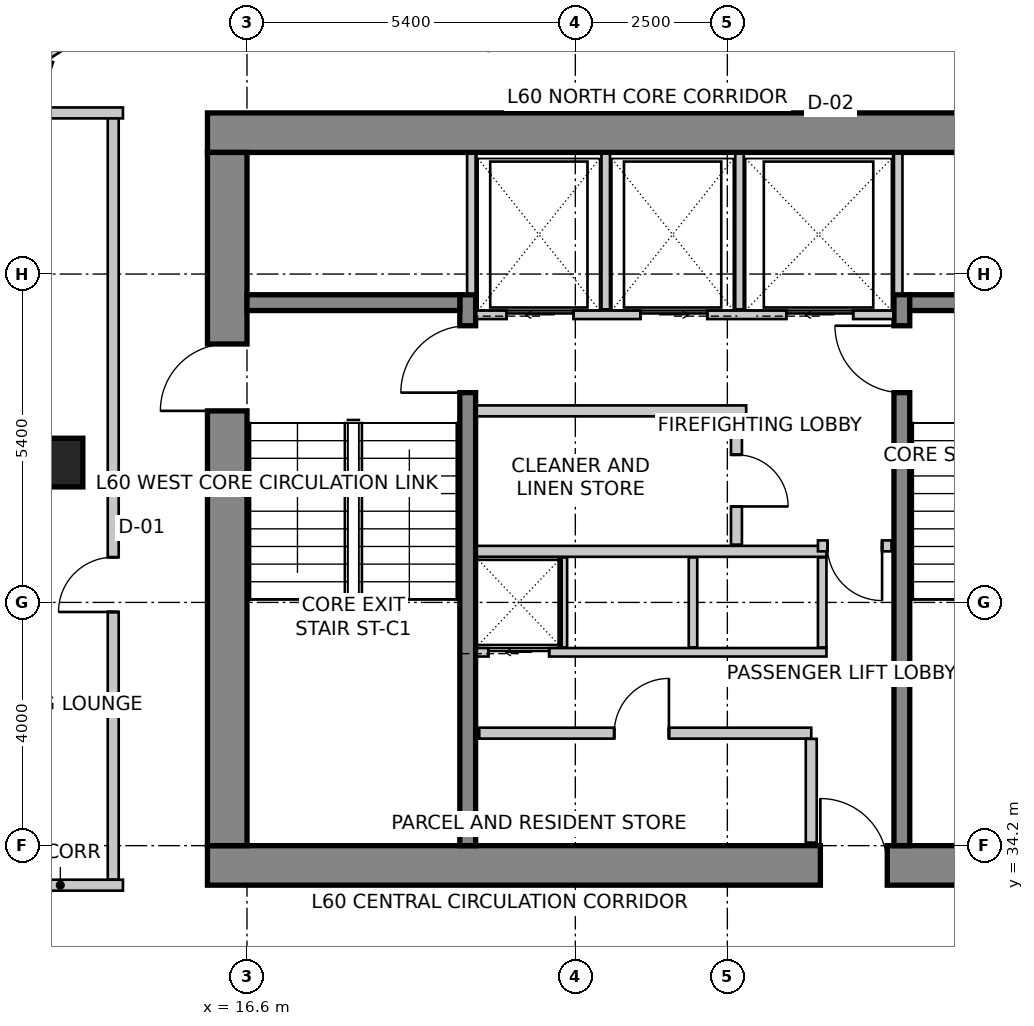
"""IFC4 building model, lengths in metres.
Left out: names, types, materials, properties, quantities, classifications, styles, units other than length and angle.
Written with IfcOpenShell. Run it as: python <this file> out.ifc"""

import sys

from ifc_helpers import new_model, si_unit, direction, frame, frame_2d, origin, origin_2d, place, context, subcontext, project, spatial, rectangle, extrude, source, transform, mapped, element, fill, save


model = new_model("IFC4")
c1 = context("Model", 3, precision=1e-05, world=origin(), true_north=direction((0.0, 1.0)))
c2 = subcontext(c1, "Body", "Model", "MODEL_VIEW")
j1 = project(units=[si_unit("LENGTHUNIT", "METRE"), si_unit("PLANEANGLEUNIT", "RADIAN")], contexts=[c1])
p1 = place(None, origin())
s1 = spatial("IfcSite", under=j1, at=p1, CompositionType="ELEMENT")
p2 = place(p1, origin())
s2 = spatial("IfcBuilding", under=s1, at=p2, CompositionType="ELEMENT")
p3 = place(p2, frame((0.0, 0.0, 235.9)))
s3 = spatial("IfcBuildingStorey", under=s2, at=p3, CompositionType="ELEMENT", Elevation=235.9)
p4 = place(p3, frame((15.95, 45.925, 0.0), z_axis=(0.0, 0.0, 1.0), x_axis=(1.0, 0.0, 0.0)))
e1 = element("IfcWall", 1, at=p4, inside=s3, PredefinedType="SHEAR", context=c2, shape_type="SweptSolid", body=[
    extrude(rectangle(XDim=15.7, YDim=0.65, at=frame_2d((7.85, 0.0))), origin(), (0.0, 0.0, 1.0), 3.5),
])
p5 = place(p3, frame((15.95, 33.875, 0.0), z_axis=(0.0, 0.0, 1.0), x_axis=(1.0, 0.0, 0.0)))
e2 = element("IfcWall", 2, at=p5, inside=s3, PredefinedType="SHEAR", context=c2, shape_type="SweptSolid", body=[
    extrude(rectangle(XDim=15.7, YDim=0.65, at=frame_2d((7.85, 0.0))), origin(), (0.0, 0.0, 1.0), 3.5),
])
m1 = source(origin(), c2, "Body", "SweptSolid", [
    extrude(rectangle(XDim=1.1, YDim=2.15, at=frame_2d((0.55, 1.075))), frame((0.0, 0.335, 0.0), z_axis=(0.0, -1.0, 0.0), x_axis=(1.0, 0.0, 0.0)), (0.0, 0.0, 1.0), 0.67),
])
p6 = place(p5, frame((10.08, 0.0, 0.0)))
e3 = element("IfcOpeningElement", 3, at=p6, cuts=e2, PredefinedType="OPENING", context=c2, shape_type="MappedRepresentation", body=[
    mapped(m1, transform((0.0, 0.0, 0.0), scale=1.0)),
])
p7 = place(p3, frame((16.275, 34.2, 0.0), z_axis=(0.0, 0.0, 1.0), x_axis=(0.0, 1.0, 0.0)))
e4 = element("IfcWall", 4, at=p7, inside=s3, PredefinedType="SHEAR", context=c2, shape_type="SweptSolid", body=[
    extrude(rectangle(XDim=11.4, YDim=0.65, at=frame_2d((5.7, 0.0))), origin(), (0.0, 0.0, 1.0), 3.5),
])
p8 = place(p7, frame((7.15, 0.0, 0.0)))
e5 = element("IfcOpeningElement", 5, at=p8, cuts=e4, PredefinedType="OPENING", context=c2, shape_type="MappedRepresentation", body=[
    mapped(m1, transform((0.0, 0.0, 0.0), scale=1.0)),
])
p9 = place(p3, frame((20.23, 34.2, 0.0), z_axis=(0.0, 0.0, 1.0), x_axis=(0.0, 1.0, 0.0)))
e6 = element("IfcWall", 6, at=p9, inside=s3, PredefinedType="SHEAR", context=c2, shape_type="SweptSolid", body=[
    extrude(rectangle(XDim=9.06, YDim=0.26, at=frame_2d((4.53, 0.0))), origin(), (0.0, 0.0, 1.0), 3.5),
])
m2 = source(origin(), c2, "Body", "SweptSolid", [
    extrude(rectangle(XDim=1.1, YDim=2.15, at=frame_2d((0.55, 1.075))), frame((0.0, 0.14, 0.0), z_axis=(0.0, -1.0, 0.0), x_axis=(1.0, 0.0, 0.0)), (0.0, 0.0, 1.0), 0.28),
])
p10 = place(p9, frame((7.45, 0.0, 0.0)))
e7 = element("IfcOpeningElement", 7, at=p10, cuts=e6, PredefinedType="OPENING", context=c2, shape_type="MappedRepresentation", body=[
    mapped(m2, transform((0.0, 0.0, 0.0), scale=1.0)),
])
p11 = place(p3, frame((27.37, 34.2, 0.0), z_axis=(0.0, 0.0, 1.0), x_axis=(0.0, 1.0, 0.0)))
e8 = element("IfcWall", 8, at=p11, inside=s3, PredefinedType="SHEAR", context=c2, shape_type="SweptSolid", body=[
    extrude(rectangle(XDim=9.06, YDim=0.26, at=frame_2d((4.53, 0.0))), origin(), (0.0, 0.0, 1.0), 3.5),
])
p12 = place(p11, frame((7.45, 0.0, 0.0)))
e9 = element("IfcOpeningElement", 9, at=p12, cuts=e8, PredefinedType="OPENING", context=c2, shape_type="MappedRepresentation", body=[
    mapped(m2, transform((0.0, 0.0, 0.0), scale=1.0)),
])
for number, where, z_axis, x_axis in (
    (10, (16.6, 43.13, 0.0), (0.0, 0.0, 1.0), (1.0, 0.0, 0.0)),
    (11, (27.5, 43.13, 0.0), (0.0, 0.0, 1.0), (1.0, 0.0, 0.0)),
):
    element("IfcWall", number, at=place(p3, frame(where, z_axis=z_axis, x_axis=x_axis)), inside=s3, PredefinedType="SHEAR", context=c2, shape_type="SweptSolid", body=[
        extrude(rectangle(XDim=3.5, YDim=0.26, at=frame_2d((1.75, 0.0))), origin(), (0.0, 0.0, 1.0), 3.5),
    ])
m3 = source(origin(), c2, "Body", "SweptSolid", [
    extrude(rectangle(XDim=0.8, YDim=0.8, at=origin_2d()), origin(), (0.0, 0.0, 1.0), 3.5),
])
p13 = place(p3, frame((13.5, 40.5, 0.0), z_axis=(0.0, 0.0, 1.0), x_axis=(1.0, 0.0, 0.0)))
e12 = element("IfcColumn", 12, at=p13, inside=s3, PredefinedType="COLUMN", context=c2, shape_type="MappedRepresentation", body=[
    mapped(m3, transform((0.0, 0.0, 0.0), scale=1.0)),
])
p14 = place(p3, frame((27.652, 30.892, 0.0), z_axis=(0.0, 0.0, 1.0), x_axis=(0.707106781187, 0.707106781187, 0.0)))
e13 = element("IfcWall", 13, at=p14, inside=s3, PredefinedType="SOLIDWALL", context=c2, shape_type="SweptSolid", body=[
    extrude(rectangle(XDim=2.907, YDim=0.3, at=frame_2d((1.454, 0.0))), origin(), (0.0, 0.0, 1.0), 3.25),
])
p15 = place(p3, frame((21.874, 52.742, 0.0), z_axis=(0.0, 0.0, 1.0), x_axis=(-0.84365659959, -0.536883173482, 0.0)))
e14 = element("IfcWall", 14, at=p15, inside=s3, PredefinedType="SOLIDWALL", context=c2, shape_type="SweptSolid", body=[
    extrude(rectangle(XDim=10.283, YDim=0.3, at=frame_2d((5.142, 0.0))), origin(), (0.0, 0.0, 1.0), 3.25),
])
m4 = source(origin(), c2, "Body", "SweptSolid", [
    extrude(rectangle(XDim=2.1, YDim=2.0, at=frame_2d((1.05, 1.0))), frame((0.0, 0.16, 0.0), z_axis=(0.0, -1.0, 0.0), x_axis=(1.0, 0.0, 0.0)), (0.0, 0.0, 1.0), 0.32),
])
p16 = place(p15, frame((3.457, 0.0, 0.85)))
e15 = element("IfcOpeningElement", 15, at=p16, cuts=e14, PredefinedType="OPENING", context=c2, shape_type="MappedRepresentation", body=[
    mapped(m4, transform((0.0, 0.0, 0.0), scale=1.0)),
])
p17 = place(p3, frame((13.269, 47.134, 0.0), z_axis=(0.0, 0.0, 1.0), x_axis=(-0.319920776449, -0.947444297464, 0.0)))
e16 = element("IfcWall", 16, at=p17, inside=s3, PredefinedType="SOLIDWALL", context=c2, shape_type="SweptSolid", body=[
    extrude(rectangle(XDim=16.133, YDim=0.3, at=frame_2d((8.067, 0.0))), origin(), (0.0, 0.0, 1.0), 3.25),
])
m5 = source(origin(), c2, "Body", "SweptSolid", [
    extrude(rectangle(XDim=2.4, YDim=2.2, at=frame_2d((1.2, 1.1))), frame((0.0, 0.16, 0.0), z_axis=(0.0, -1.0, 0.0), x_axis=(1.0, 0.0, 0.0)), (0.0, 0.0, 1.0), 0.32),
])
p18 = place(p17, frame((2.363, 0.0, 0.85)))
e17 = element("IfcOpeningElement", 17, at=p18, cuts=e16, PredefinedType="OPENING", context=c2, shape_type="MappedRepresentation", body=[
    mapped(m5, transform((0.0, 0.0, 0.0), scale=1.0)),
])
p19 = place(p17, frame((7.41, 0.0, 0.85)))
e18 = element("IfcOpeningElement", 18, at=p19, cuts=e16, PredefinedType="OPENING", context=c2, shape_type="MappedRepresentation", body=[
    mapped(m4, transform((0.0, 0.0, 0.0), scale=1.0)),
])
p20 = place(p17, frame((12.157, 0.0, 0.85)))
e19 = element("IfcOpeningElement", 19, at=p20, cuts=e16, PredefinedType="OPENING", context=c2, shape_type="MappedRepresentation", body=[
    mapped(m5, transform((0.0, 0.0, 0.0), scale=1.0)),
])
p21 = place(p3, frame((20.37, 42.93, 0.0), z_axis=(0.0, 0.0, 1.0), x_axis=(1.0, 0.0, 0.0)))
e20 = element("IfcWall", 20, at=p21, inside=s3, PredefinedType="SOLIDWALL", context=c2, shape_type="SweptSolid", body=[
    extrude(rectangle(XDim=6.86, YDim=0.14, at=frame_2d((3.43, 0.0))), origin(), (0.0, 0.0, 1.0), 3.25),
])
m6 = source(origin(), c2, "Body", "SweptSolid", [
    extrude(rectangle(XDim=1.1, YDim=2.15, at=frame_2d((0.55, 1.075))), frame((0.0, 0.08, 0.0), z_axis=(0.0, -1.0, 0.0), x_axis=(1.0, 0.0, 0.0)), (0.0, 0.0, 1.0), 0.16),
])
p22 = place(p21, frame((0.5, 0.0, 0.0)))
e21 = element("IfcOpeningElement", 21, at=p22, cuts=e20, PredefinedType="OPENING", context=c2, shape_type="MappedRepresentation", body=[
    mapped(m6, transform((0.0, 0.0, 0.0), scale=1.0)),
])
p23 = place(p21, frame((2.7, 0.0, 0.0)))
e22 = element("IfcOpeningElement", 22, at=p23, cuts=e20, PredefinedType="OPENING", context=c2, shape_type="MappedRepresentation", body=[
    mapped(m6, transform((0.0, 0.0, 0.0), scale=1.0)),
])
p24 = place(p21, frame((5.1, 0.0, 0.0)))
e23 = element("IfcOpeningElement", 23, at=p24, cuts=e20, PredefinedType="OPENING", context=c2, shape_type="MappedRepresentation", body=[
    mapped(m6, transform((0.0, 0.0, 0.0), scale=1.0)),
])
for number, where, z_axis, x_axis in (
    (24, (20.29, 43.28, 0.0), (0.0, 0.0, 1.0), (0.0, 1.0, 0.0)),
    (25, (27.31, 43.28, 0.0), (0.0, 0.0, 1.0), (0.0, 1.0, 0.0)),
):
    element("IfcWall", number, at=place(p3, frame(where, z_axis=z_axis, x_axis=x_axis)), inside=s3, PredefinedType="SOLIDWALL", context=c2, shape_type="SweptSolid", body=[
        extrude(rectangle(XDim=2.3, YDim=0.14, at=frame_2d((1.15, 0.0))), origin(), (0.0, 0.0, 1.0), 3.25),
    ])
for number, where, z_axis, x_axis in (
    (26, (22.5, 43.02, 0.0), (0.0, 0.0, 1.0), (0.0, 1.0, 0.0)),
    (27, (24.7, 43.02, 0.0), (0.0, 0.0, 1.0), (0.0, 1.0, 0.0)),
):
    element("IfcWall", number, at=place(p3, frame(where, z_axis=z_axis, x_axis=x_axis)), inside=s3, PredefinedType="SOLIDWALL", context=c2, shape_type="SweptSolid", body=[
        extrude(rectangle(XDim=2.56, YDim=0.14, at=frame_2d((1.28, 0.0))), origin(), (0.0, 0.0, 1.0), 3.25),
    ])
p25 = place(p3, frame((20.38, 37.38, 0.0), z_axis=(0.0, 0.0, 1.0), x_axis=(1.0, 0.0, 0.0)))
e28 = element("IfcWall", 28, at=p25, inside=s3, PredefinedType="SOLIDWALL", context=c2, shape_type="SweptSolid", body=[
    extrude(rectangle(XDim=5.75, YDim=0.14, at=frame_2d((2.875, 0.0))), origin(), (0.0, 0.0, 1.0), 3.25),
])
m7 = source(origin(), c2, "Body", "SweptSolid", [
    extrude(rectangle(XDim=1.0, YDim=2.15, at=frame_2d((0.5, 1.075))), frame((0.0, 0.08, 0.0), z_axis=(0.0, -1.0, 0.0), x_axis=(1.0, 0.0, 0.0)), (0.0, 0.0, 1.0), 0.16),
])
p26 = place(p25, frame((0.19, 0.0, 0.0)))
e29 = element("IfcOpeningElement", 29, at=p26, cuts=e28, PredefinedType="OPENING", context=c2, shape_type="MappedRepresentation", body=[
    mapped(m7, transform((0.0, 0.0, 0.0), scale=1.0)),
])
p27 = place(p3, frame((20.38, 39.04, 0.0), z_axis=(0.0, 0.0, 1.0), x_axis=(1.0, 0.0, 0.0)))
e30 = element("IfcWall", 30, at=p27, inside=s3, PredefinedType="SOLIDWALL", context=c2, shape_type="SweptSolid", body=[
    extrude(rectangle(XDim=5.75, YDim=0.18, at=frame_2d((2.875, 0.0))), origin(), (0.0, 0.0, 1.0), 3.25),
])
for number, where, z_axis, x_axis in (
    (31, (26.06, 37.46, 0.0), (0.0, 0.0, 1.0), (0.0, 1.0, 0.0)),
    (32, (21.795, 37.46, 0.0), (0.0, 0.0, 1.0), (0.0, 1.0, 0.0)),
    (33, (23.935, 37.46, 0.0), (0.0, 0.0, 1.0), (0.0, 1.0, 0.0)),
):
    element("IfcWall", number, at=place(p3, frame(where, z_axis=z_axis, x_axis=x_axis)), inside=s3, PredefinedType="SOLIDWALL", context=c2, shape_type="SweptSolid", body=[
        extrude(rectangle(XDim=1.48, YDim=0.14, at=frame_2d((0.74, 0.0))), origin(), (0.0, 0.0, 1.0), 3.25),
    ])
p28 = place(p3, frame((24.81, 41.35, 0.0), z_axis=(0.0, 0.0, 1.0), x_axis=(-1.0, 0.0, 0.0)))
e34 = element("IfcWall", 34, at=p28, inside=s3, PredefinedType="PARTITIONING", context=c2, shape_type="SweptSolid", body=[
    extrude(rectangle(XDim=4.43, YDim=0.18, at=frame_2d((2.215, 0.0))), origin(), (0.0, 0.0, 1.0), 3.25),
])
p29 = place(p3, frame((24.65, 41.256, 0.0), z_axis=(0.0, 0.0, 1.0), x_axis=(0.0, -1.0, 0.0)))
e35 = element("IfcWall", 35, at=p29, inside=s3, PredefinedType="PARTITIONING", context=c2, shape_type="SweptSolid", body=[
    extrude(rectangle(XDim=2.106, YDim=0.18, at=frame_2d((1.053, 0.0))), origin(), (0.0, 0.0, 1.0), 3.25),
])
m8 = source(origin(), c2, "Body", "SweptSolid", [
    extrude(rectangle(XDim=0.85, YDim=2.15, at=frame_2d((0.425, 1.075))), frame((0.0, 0.1, 0.0), z_axis=(0.0, -1.0, 0.0), x_axis=(1.0, 0.0, 0.0)), (0.0, 0.0, 1.0), 0.2),
])
p30 = place(p29, frame((0.628, 0.0, 0.0)))
e36 = element("IfcOpeningElement", 36, at=p30, cuts=e35, PredefinedType="OPENING", context=c2, shape_type="MappedRepresentation", body=[
    mapped(m8, transform((0.0, 0.0, 0.0), scale=1.0)),
])
p31 = place(p3, frame((27.2, 39.13, 0.0), z_axis=(0.0, 0.0, 1.0), x_axis=(-1.0, 0.0, 0.0)))
e37 = element("IfcWall", 37, at=p31, inside=s3, PredefinedType="PARTITIONING", context=c2, shape_type="SweptSolid", body=[
    extrude(rectangle(XDim=1.21, YDim=0.18, at=frame_2d((0.605, 0.0))), origin(), (0.0, 0.0, 1.0), 3.25),
])
m9 = source(origin(), c2, "Body", "SweptSolid", [
    extrude(rectangle(XDim=0.9, YDim=2.15, at=frame_2d((0.45, 1.075))), frame((0.0, 0.1, 0.0), z_axis=(0.0, -1.0, 0.0), x_axis=(1.0, 0.0, 0.0)), (0.0, 0.0, 1.0), 0.2),
])
p32 = place(p31, frame((0.155, 0.0, 0.0)))
e38 = element("IfcOpeningElement", 38, at=p32, cuts=e37, PredefinedType="OPENING", context=c2, shape_type="MappedRepresentation", body=[
    mapped(m9, transform((0.0, 0.0, 0.0), scale=1.0)),
])
p33 = place(p3, frame((20.42, 36.05, 0.0), z_axis=(0.0, 0.0, 1.0), x_axis=(1.0, 0.0, 0.0)))
e39 = element("IfcWall", 39, at=p33, inside=s3, PredefinedType="PARTITIONING", context=c2, shape_type="SweptSolid", body=[
    extrude(rectangle(XDim=5.46, YDim=0.18, at=frame_2d((2.73, 0.0))), origin(), (0.0, 0.0, 1.0), 3.25),
])
p34 = place(p33, frame((2.219, 0.0, 0.0)))
e40 = element("IfcOpeningElement", 40, at=p34, cuts=e39, PredefinedType="OPENING", context=c2, shape_type="MappedRepresentation", body=[
    mapped(m9, transform((0.0, 0.0, 0.0), scale=1.0)),
])
p35 = place(p3, frame((25.88, 35.956, 0.0), z_axis=(0.0, 0.0, 1.0), x_axis=(0.0, -1.0, 0.0)))
e41 = element("IfcWall", 41, at=p35, inside=s3, PredefinedType="PARTITIONING", context=c2, shape_type="SweptSolid", body=[
    extrude(rectangle(XDim=1.706, YDim=0.18, at=frame_2d((0.853, 0.0))), origin(), (0.0, 0.0, 1.0), 2.542),
])
p36 = place(p3, frame((12.5, 33.55, 0.0), z_axis=(0.0, 0.0, 1.0), x_axis=(1.0, 0.0, 0.0)))
e42 = element("IfcWall", 42, at=p36, inside=s3, PredefinedType="PARTITIONING", context=c2, shape_type="SweptSolid", body=[
    extrude(rectangle(XDim=2.06, YDim=0.18, at=frame_2d((1.03, 0.0))), origin(), (0.0, 0.0, 1.0), 3.25),
])
p37 = place(p3, frame((14.4, 33.644, 0.0), z_axis=(0.0, 0.0, 1.0), x_axis=(0.0, 1.0, 0.0)))
e43 = element("IfcWall", 43, at=p37, inside=s3, PredefinedType="PARTITIONING", context=c2, shape_type="SweptSolid", body=[
    extrude(rectangle(XDim=12.606, YDim=0.18, at=frame_2d((6.303, 0.0))), origin(), (0.0, 0.0, 1.0), 3.25),
])
p38 = place(p37, frame((4.399, 0.0, 0.0)))
e44 = element("IfcOpeningElement", 44, at=p38, cuts=e43, PredefinedType="OPENING", context=c2, shape_type="MappedRepresentation", body=[
    mapped(m9, transform((0.0, 0.0, 0.0), scale=1.0)),
])
p39 = place(p3, frame((14.56, 46.25, 0.0), z_axis=(0.0, 0.0, 1.0), x_axis=(-1.0, 0.0, 0.0)))
e45 = element("IfcWall", 45, at=p39, inside=s3, PredefinedType="PARTITIONING", context=c2, shape_type="SweptSolid", body=[
    extrude(rectangle(XDim=1.469, YDim=0.18, at=frame_2d((0.734, 0.0))), origin(), (0.0, 0.0, 1.0), 3.25),
])
m10 = source(origin(), c2, "Body", "SweptSolid", [
    extrude(rectangle(XDim=1.1, YDim=2.15, at=frame_2d((0.55, 1.075))), frame((0.0, 0.025, 0.0), z_axis=(0.0, -1.0, 0.0), x_axis=(1.0, 0.0, 0.0)), (0.0, 0.0, 1.0), 0.05),
])
p40 = place(p22, origin())
e46 = element("IfcDoor", 46, at=p40, inside=s3, OperationType="SLIDING_TO_LEFT", PredefinedType="DOOR", context=c2, shape_type="MappedRepresentation", body=[
    mapped(m10, transform((0.0, 0.0, 0.0), scale=1.0)),
])
fill(e21, e46)
p41 = place(p23, origin())
e47 = element("IfcDoor", 47, at=p41, inside=s3, OperationType="SLIDING_TO_RIGHT", PredefinedType="DOOR", context=c2, shape_type="MappedRepresentation", body=[
    mapped(m10, transform((0.0, 0.0, 0.0), scale=1.0)),
])
fill(e22, e47)
m11 = source(origin(), c2, "Body", "SweptSolid", [
    extrude(rectangle(XDim=1.1, YDim=2.15, at=frame_2d((0.55, 1.075))), frame((0.0, 0.025, 0.0), z_axis=(0.0, -1.0, 0.0), x_axis=(1.0, 0.0, 0.0)), (0.0, 0.0, 1.0), 0.05),
])
p42 = place(p24, origin())
e48 = element("IfcDoor", 48, at=p42, inside=s3, OperationType="SLIDING_TO_LEFT", PredefinedType="DOOR", context=c2, shape_type="MappedRepresentation", body=[
    mapped(m11, transform((0.0, 0.0, 0.0), scale=1.0)),
])
fill(e23, e48)
m12 = source(origin(), c2, "Body", "SweptSolid", [
    extrude(rectangle(XDim=1.0, YDim=2.15, at=frame_2d((0.5, 1.075))), frame((0.0, 0.025, 0.0), z_axis=(0.0, -1.0, 0.0), x_axis=(1.0, 0.0, 0.0)), (0.0, 0.0, 1.0), 0.05),
])
p43 = place(p26, origin())
e49 = element("IfcDoor", 49, at=p43, inside=s3, OperationType="SLIDING_TO_LEFT", PredefinedType="DOOR", context=c2, shape_type="MappedRepresentation", body=[
    mapped(m12, transform((0.0, 0.0, 0.0), scale=1.0)),
])
fill(e29, e49)
m13 = source(origin(), c2, "Body", "SweptSolid", [
    extrude(rectangle(XDim=1.1, YDim=2.15, at=frame_2d((0.55, 1.075))), frame((0.0, 0.025, 0.0), z_axis=(0.0, -1.0, 0.0), x_axis=(1.0, 0.0, 0.0)), (0.0, 0.0, 1.0), 0.05),
])
p44 = place(p10, origin())
e50 = element("IfcDoor", 50, at=p44, inside=s3, OperationType="SINGLE_SWING_LEFT", PredefinedType="DOOR", context=c2, shape_type="MappedRepresentation", body=[
    mapped(m13, transform((0.0, 0.0, 0.0), scale=1.0)),
])
fill(e7, e50)
p45 = place(p12, origin())
e51 = element("IfcDoor", 51, at=p45, inside=s3, OperationType="SINGLE_SWING_RIGHT", PredefinedType="DOOR", context=c2, shape_type="MappedRepresentation", body=[
    mapped(m13, transform((0.0, 0.0, 0.0), scale=1.0)),
])
fill(e9, e51)
p46 = place(p8, origin())
e52 = element("IfcDoor", 52, at=p46, inside=s3, OperationType="SINGLE_SWING_LEFT", PredefinedType="DOOR", context=c2, shape_type="MappedRepresentation", body=[
    mapped(m13, transform((0.0, 0.0, 0.0), scale=1.0)),
])
fill(e5, e52)
p47 = place(p6, origin())
e53 = element("IfcDoor", 53, at=p47, inside=s3, OperationType="SINGLE_SWING_LEFT", PredefinedType="DOOR", context=c2, shape_type="MappedRepresentation", body=[
    mapped(m13, transform((0.0, 0.0, 0.0), scale=1.0)),
])
fill(e3, e53)
m14 = source(origin(), c2, "Body", "SweptSolid", [
    extrude(rectangle(XDim=0.85, YDim=2.15, at=frame_2d((0.425, 1.075))), frame((0.0, 0.025, 0.0), z_axis=(0.0, -1.0, 0.0), x_axis=(1.0, 0.0, 0.0)), (0.0, 0.0, 1.0), 0.05),
])
p48 = place(p30, origin())
e54 = element("IfcDoor", 54, at=p48, inside=s3, OperationType="SINGLE_SWING_RIGHT", PredefinedType="DOOR", context=c2, shape_type="MappedRepresentation", body=[
    mapped(m14, transform((0.0, 0.0, 0.0), scale=1.0)),
])
fill(e36, e54)
m15 = source(origin(), c2, "Body", "SweptSolid", [
    extrude(rectangle(XDim=0.9, YDim=2.15, at=frame_2d((0.45, 1.075))), frame((0.0, 0.025, 0.0), z_axis=(0.0, -1.0, 0.0), x_axis=(1.0, 0.0, 0.0)), (0.0, 0.0, 1.0), 0.05),
])
p49 = place(p32, origin())
e55 = element("IfcDoor", 55, at=p49, inside=s3, OperationType="SINGLE_SWING_LEFT", PredefinedType="DOOR", context=c2, shape_type="MappedRepresentation", body=[
    mapped(m15, transform((0.0, 0.0, 0.0), scale=1.0)),
])
fill(e38, e55)
p50 = place(p34, origin())
e56 = element("IfcDoor", 56, at=p50, inside=s3, OperationType="SINGLE_SWING_RIGHT", PredefinedType="DOOR", context=c2, shape_type="MappedRepresentation", body=[
    mapped(m15, transform((0.0, 0.0, 0.0), scale=1.0)),
])
fill(e40, e56)
m16 = source(origin(), c2, "Body", "SweptSolid", [
    extrude(rectangle(XDim=0.9, YDim=2.15, at=frame_2d((0.45, 1.075))), frame((0.0, 0.025, 0.0), z_axis=(0.0, -1.0, 0.0), x_axis=(1.0, 0.0, 0.0)), (0.0, 0.0, 1.0), 0.05),
])
p51 = place(p38, origin())
e57 = element("IfcDoor", 57, at=p51, inside=s3, OperationType="SINGLE_SWING_LEFT", PredefinedType="DOOR", context=c2, shape_type="MappedRepresentation", body=[
    mapped(m16, transform((0.0, 0.0, 0.0), scale=1.0)),
])
fill(e44, e57)
save(model, sys.argv[1])
